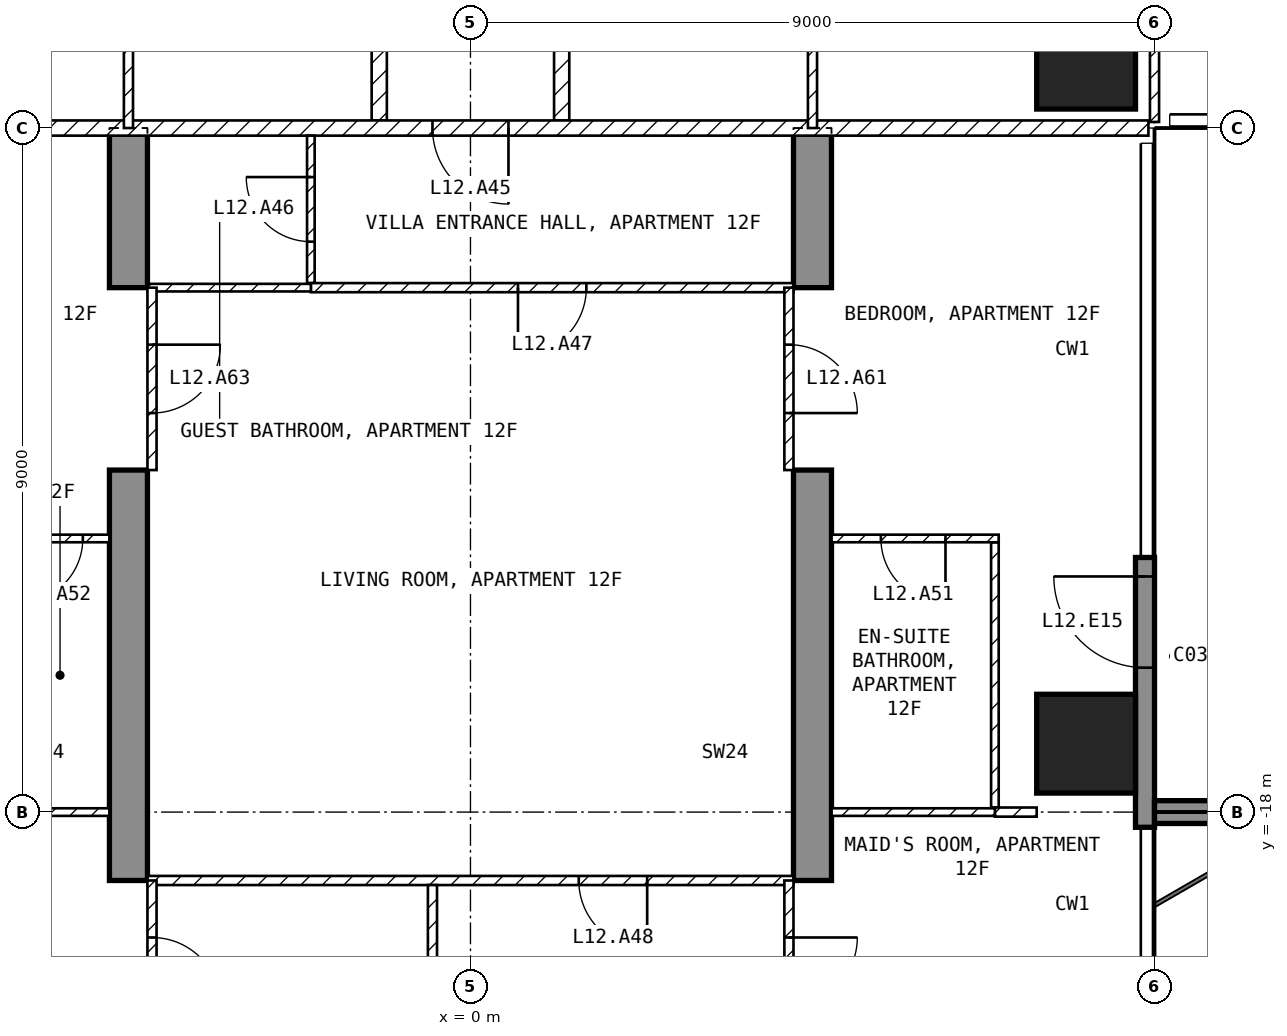
"""IFC4 building model, lengths in metres.
Left out: names, types, materials, properties, quantities, classifications, styles, units other than length and angle.
Written with IfcOpenShell. Run it as: python <this file> out.ifc"""

import sys

from ifc_helpers import new_model, si_unit, direction, frame, frame_2d, origin, origin_2d, place, context, subcontext, project, spatial, polyline, rectangle, outline, extrude, element, fill, save


model = new_model("IFC4")
c1 = context("Model", 3, precision=1e-05, world=origin(), true_north=direction((0.0, 1.0)))
c2 = subcontext(c1, "Body", "Model", "MODEL_VIEW")
j1 = project(units=[si_unit("LENGTHUNIT", "METRE"), si_unit("PLANEANGLEUNIT", "RADIAN")], contexts=[c1])
p1 = place(None, origin())
s1 = spatial("IfcSite", under=j1, at=p1, CompositionType="ELEMENT")
p2 = place(p1, origin())
s2 = spatial("IfcBuilding", under=s1, at=p2, CompositionType="ELEMENT")
p3 = place(p2, frame((0.0, 0.0, 61.0)))
s3 = spatial("IfcBuildingStorey", under=s2, at=p3, CompositionType="ELEMENT", Elevation=61.0)
for number, where, z_axis, x_axis in (
    (1, (8.1, -17.1, -0.25), (0.0, 0.0, 1.0), (1.0, 0.0, 0.0)),
    (2, (8.1, -8.1, -0.25), (0.0, 0.0, 1.0), (1.0, 0.0, 0.0)),
):
    element("IfcColumn", number, at=place(p3, frame(where, z_axis=z_axis, x_axis=x_axis)), inside=s3, PredefinedType="COLUMN", context=c2, shape_type="SweptSolid", body=[
        extrude(rectangle(XDim=1.3, YDim=1.3, at=origin_2d()), origin(), (0.0, 0.0, 1.0), 3.5),
    ])
for number, where, z_axis, x_axis in (
    (3, (-4.75, -25.45, -0.25), (1.0, 0.0, 0.0), (0.0, 1.0, 0.0)),
    (4, (4.25, -25.45, -0.25), (1.0, 0.0, 0.0), (0.0, 1.0, 0.0)),
):
    element("IfcWall", number, at=place(p3, frame(where, z_axis=z_axis, x_axis=x_axis)), inside=s3, PredefinedType="SHEAR", context=c2, shape_type="SweptSolid", body=[
        extrude(outline(polyline([(0.0, 0.0), (4.15, 0.0), (4.15, 2.65), (6.55, 2.65), (6.55, 0.0), (11.95, 0.0), (11.95, 2.65), (14.35, 2.65), (14.35, 0.0), (16.45, 0.0), (16.45, 3.5), (0.0, 3.5), (0.0, 0.0)])), origin(), (0.0, 0.0, 1.0), 0.5),
    ])
p4 = place(p3, frame((8.875, -18.2, 0.0), z_axis=(0.0, 0.0, 1.0), x_axis=(0.0, 1.0, 0.0)))
e5 = element("IfcWall", 5, at=p4, inside=s3, PredefinedType="SOLIDWALL", context=c2, shape_type="SweptSolid", body=[
    extrude(rectangle(XDim=3.55, YDim=0.25, at=frame_2d((1.775, 0.0))), origin(), (0.0, 0.0, 1.0), 3.25),
])
p5 = place(p4, frame((2.1, 0.0, 0.0)))
e6 = element("IfcOpeningElement", 6, at=p5, cuts=e5, PredefinedType="OPENING", context=c2, shape_type="SweptSolid", body=[
    extrude(rectangle(XDim=1.2, YDim=2.4, at=frame_2d((0.6, 1.2))), frame((0.0, 0.135, 0.0), z_axis=(0.0, -1.0, 0.0), x_axis=(1.0, 0.0, 0.0)), (0.0, 0.0, 1.0), 0.27),
])
p6 = place(p3, frame((9.0, -18.0, 0.0), z_axis=(0.0, 0.0, 1.0), x_axis=(1.0, 0.0, 0.0)))
e7 = element("IfcWall", 7, at=p6, inside=s3, PredefinedType="SOLIDWALL", context=c2, shape_type="SweptSolid", body=[
    extrude(rectangle(XDim=2.7, YDim=0.3, at=frame_2d((1.35, 0.0))), origin(), (0.0, 0.0, 1.0), 3.25),
])
for number, where, z_axis, x_axis in (
    (8, (1.2, -1.3, 0.0), (0.0, 0.0, 1.0), (0.0, -1.0, 0.0)),
    (9, (-1.2, -8.9, 0.0), (0.0, 0.0, 1.0), (0.0, 1.0, 0.0)),
):
    element("IfcWall", number, at=place(p3, frame(where, z_axis=z_axis, x_axis=x_axis)), inside=s3, PredefinedType="PARTITIONING", context=c2, shape_type="SweptSolid", body=[
        extrude(rectangle(XDim=7.6, YDim=0.2, at=frame_2d((3.8, 0.0))), origin(), (0.0, 0.0, 1.0), 3.25),
    ])
p7 = place(p3, frame((8.92, -9.0, 0.0), z_axis=(0.0, 0.0, 1.0), x_axis=(-1.0, 0.0, 0.0)))
e10 = element("IfcWall", 10, at=p7, inside=s3, PredefinedType="PARTITIONING", context=c2, shape_type="SweptSolid", body=[
    extrude(rectangle(XDim=17.84, YDim=0.2, at=frame_2d((8.92, 0.0))), origin(), (0.0, 0.0, 1.0), 3.25),
])
p8 = place(p7, frame((8.42, 0.0, 0.0)))
e11 = element("IfcOpeningElement", 11, at=p8, cuts=e10, PredefinedType="OPENING", context=c2, shape_type="SweptSolid", body=[
    extrude(rectangle(XDim=1.0, YDim=2.1, at=frame_2d((0.5, 1.05))), frame((0.0, 0.11, 0.0), z_axis=(0.0, -1.0, 0.0), x_axis=(1.0, 0.0, 0.0)), (0.0, 0.0, 1.0), 0.22),
])
p9 = place(p3, frame((9.0, -8.92, 0.0), z_axis=(0.0, 0.0, 1.0), x_axis=(0.0, 1.0, 0.0)))
e12 = element("IfcWall", 12, at=p9, inside=s3, PredefinedType="PARTITIONING", context=c2, shape_type="SweptSolid", body=[
    extrude(rectangle(XDim=7.62, YDim=0.12, at=frame_2d((3.81, 0.0))), origin(), (0.0, 0.0, 1.0), 3.25),
])
p10 = place(p9, frame((2.67, 0.0, 0.0)))
e13 = element("IfcOpeningElement", 13, at=p10, cuts=e12, PredefinedType="OPENING", context=c2, shape_type="SweptSolid", body=[
    extrude(rectangle(XDim=0.9, YDim=2.1, at=frame_2d((0.45, 1.05))), frame((0.0, 0.07, 0.0), z_axis=(0.0, -1.0, 0.0), x_axis=(1.0, 0.0, 0.0)), (0.0, 0.0, 1.0), 0.14),
])
p11 = place(p3, frame((4.5, -9.0, 0.0), z_axis=(0.0, 0.0, 1.0), x_axis=(0.0, 1.0, 0.0)))
e14 = element("IfcWall", 14, at=p11, inside=s3, PredefinedType="PARTITIONING", context=c2, shape_type="SweptSolid", body=[
    extrude(rectangle(XDim=7.7, YDim=0.12, at=frame_2d((3.85, 0.0))), origin(), (0.0, 0.0, 1.0), 3.25),
])
p12 = place(p11, frame((3.4, 0.0, 0.0)))
e15 = element("IfcOpeningElement", 15, at=p12, cuts=e14, PredefinedType="OPENING", context=c2, shape_type="SweptSolid", body=[
    extrude(rectangle(XDim=0.9, YDim=2.1, at=frame_2d((0.45, 1.05))), frame((0.0, 0.07, 0.0), z_axis=(0.0, -1.0, 0.0), x_axis=(1.0, 0.0, 0.0)), (0.0, 0.0, 1.0), 0.14),
])
p13 = place(p3, frame((-4.5, -1.3, 0.0), z_axis=(0.0, 0.0, 1.0), x_axis=(0.0, -1.0, 0.0)))
e16 = element("IfcWall", 16, at=p13, inside=s3, PredefinedType="PARTITIONING", context=c2, shape_type="SweptSolid", body=[
    extrude(rectangle(XDim=7.7, YDim=0.12, at=frame_2d((3.85, 0.0))), origin(), (0.0, 0.0, 1.0), 3.25),
])
p14 = place(p13, frame((4.988, 0.0, 0.0)))
e17 = element("IfcOpeningElement", 17, at=p14, cuts=e16, PredefinedType="OPENING", context=c2, shape_type="SweptSolid", body=[
    extrude(rectangle(XDim=0.9, YDim=2.1, at=frame_2d((0.45, 1.05))), frame((0.0, 0.07, 0.0), z_axis=(0.0, -1.0, 0.0), x_axis=(1.0, 0.0, 0.0)), (0.0, 0.0, 1.0), 0.14),
])
p15 = place(p3, frame((-2.1, -11.04, 0.0), z_axis=(0.0, 0.0, 1.0), x_axis=(0.0, 1.0, 0.0)))
e18 = element("IfcWall", 18, at=p15, inside=s3, PredefinedType="PARTITIONING", context=c2, shape_type="SweptSolid", body=[
    extrude(rectangle(XDim=1.94, YDim=0.1, at=frame_2d((0.97, 0.0))), origin(), (0.0, 0.0, 1.0), 3.25),
])
p16 = place(p15, frame((0.545, 0.0, 0.0)))
e19 = element("IfcOpeningElement", 19, at=p16, cuts=e18, PredefinedType="OPENING", context=c2, shape_type="SweptSolid", body=[
    extrude(rectangle(XDim=0.85, YDim=2.1, at=frame_2d((0.425, 1.05))), frame((0.0, 0.06, 0.0), z_axis=(0.0, -1.0, 0.0), x_axis=(1.0, 0.0, 0.0)), (0.0, 0.0, 1.0), 0.12),
])
p17 = place(p3, frame((4.25, -11.1, 0.0), z_axis=(0.0, 0.0, 1.0), x_axis=(-1.0, 0.0, 0.0)))
e20 = element("IfcWall", 20, at=p17, inside=s3, PredefinedType="PARTITIONING", context=c2, shape_type="SweptSolid", body=[
    extrude(rectangle(XDim=6.35, YDim=0.12, at=frame_2d((3.175, 0.0))), origin(), (0.0, 0.0, 1.0), 3.25),
])
p18 = place(p17, frame((2.725, 0.0, 0.0)))
e21 = element("IfcOpeningElement", 21, at=p18, cuts=e20, PredefinedType="OPENING", context=c2, shape_type="SweptSolid", body=[
    extrude(rectangle(XDim=0.9, YDim=2.1, at=frame_2d((0.45, 1.05))), frame((0.0, 0.07, 0.0), z_axis=(0.0, -1.0, 0.0), x_axis=(1.0, 0.0, 0.0)), (0.0, 0.0, 1.0), 0.14),
])
p19 = place(p3, frame((-2.1, -11.1, 0.0), z_axis=(0.0, 0.0, 1.0), x_axis=(-1.0, 0.0, 0.0)))
e22 = element("IfcWall", 22, at=p19, inside=s3, PredefinedType="PARTITIONING", context=c2, shape_type="SweptSolid", body=[
    extrude(rectangle(XDim=2.15, YDim=0.1, at=frame_2d((1.075, 0.0))), origin(), (0.0, 0.0, 1.0), 3.25),
])
p20 = place(p3, frame((4.25, -18.9, 0.0), z_axis=(0.0, 0.0, 1.0), x_axis=(-1.0, 0.0, 0.0)))
e23 = element("IfcWall", 23, at=p20, inside=s3, PredefinedType="PARTITIONING", context=c2, shape_type="SweptSolid", body=[
    extrude(rectangle(XDim=8.5, YDim=0.12, at=frame_2d((4.25, 0.0))), origin(), (0.0, 0.0, 1.0), 3.25),
])
p21 = place(p20, frame((1.925, 0.0, 0.0)))
e24 = element("IfcOpeningElement", 24, at=p21, cuts=e23, PredefinedType="OPENING", context=c2, shape_type="SweptSolid", body=[
    extrude(rectangle(XDim=0.9, YDim=2.1, at=frame_2d((0.45, 1.05))), frame((0.0, 0.07, 0.0), z_axis=(0.0, -1.0, 0.0), x_axis=(1.0, 0.0, 0.0)), (0.0, 0.0, 1.0), 0.14),
])
p22 = place(p3, frame((-0.5, -23.34, 0.0), z_axis=(0.0, 0.0, 1.0), x_axis=(0.0, 1.0, 0.0)))
e25 = element("IfcWall", 25, at=p22, inside=s3, PredefinedType="PARTITIONING", context=c2, shape_type="SweptSolid", body=[
    extrude(rectangle(XDim=4.38, YDim=0.12, at=frame_2d((2.19, 0.0))), origin(), (0.0, 0.0, 1.0), 3.25),
])
p23 = place(p22, frame((1.74, 0.0, 0.0)))
e26 = element("IfcOpeningElement", 26, at=p23, cuts=e25, PredefinedType="OPENING", context=c2, shape_type="SweptSolid", body=[
    extrude(rectangle(XDim=0.9, YDim=2.1, at=frame_2d((0.45, 1.05))), frame((0.0, 0.07, 0.0), z_axis=(0.0, -1.0, 0.0), x_axis=(1.0, 0.0, 0.0)), (0.0, 0.0, 1.0), 0.14),
])
p24 = place(p3, frame((6.9, -17.94, 0.0), z_axis=(0.0, 0.0, 1.0), x_axis=(0.0, 1.0, 0.0)))
e27 = element("IfcWall", 27, at=p24, inside=s3, PredefinedType="PARTITIONING", context=c2, shape_type="SweptSolid", body=[
    extrude(rectangle(XDim=3.49, YDim=0.1, at=frame_2d((1.745, 0.0))), origin(), (0.0, 0.0, 1.0), 3.25),
])
p25 = place(p3, frame((6.95, -14.4, 0.0), z_axis=(0.0, 0.0, 1.0), x_axis=(-1.0, 0.0, 0.0)))
e28 = element("IfcWall", 28, at=p25, inside=s3, PredefinedType="PARTITIONING", context=c2, shape_type="SweptSolid", body=[
    extrude(rectangle(XDim=2.2, YDim=0.1, at=frame_2d((1.1, 0.0))), origin(), (0.0, 0.0, 1.0), 3.25),
])
p26 = place(p25, frame((0.7, 0.0, 0.0)))
e29 = element("IfcOpeningElement", 29, at=p26, cuts=e28, PredefinedType="OPENING", context=c2, shape_type="SweptSolid", body=[
    extrude(rectangle(XDim=0.85, YDim=2.1, at=frame_2d((0.425, 1.05))), frame((0.0, 0.06, 0.0), z_axis=(0.0, -1.0, 0.0), x_axis=(1.0, 0.0, 0.0)), (0.0, 0.0, 1.0), 0.12),
])
p27 = place(p3, frame((7.45, -18.0, 0.0), z_axis=(0.0, 0.0, 1.0), x_axis=(-1.0, 0.0, 0.0)))
e30 = element("IfcWall", 30, at=p27, inside=s3, PredefinedType="PARTITIONING", context=c2, shape_type="SweptSolid", body=[
    extrude(rectangle(XDim=0.55, YDim=0.12, at=frame_2d((0.275, 0.0))), origin(), (0.0, 0.0, 1.0), 3.25),
])
p28 = place(p3, frame((6.9, -18.0, 0.0), z_axis=(0.0, 0.0, 1.0), x_axis=(-1.0, 0.0, 0.0)))
e31 = element("IfcWall", 31, at=p28, inside=s3, PredefinedType="PARTITIONING", context=c2, shape_type="SweptSolid", body=[
    extrude(rectangle(XDim=2.15, YDim=0.1, at=frame_2d((1.075, 0.0))), origin(), (0.0, 0.0, 1.0), 3.25),
])
p29 = place(p3, frame((-4.75, -14.4, 0.0), z_axis=(0.0, 0.0, 1.0), x_axis=(-1.0, 0.0, 0.0)))
e32 = element("IfcWall", 32, at=p29, inside=s3, PredefinedType="PARTITIONING", context=c2, shape_type="SweptSolid", body=[
    extrude(rectangle(XDim=1.6, YDim=0.1, at=frame_2d((0.8, 0.0))), origin(), (0.0, 0.0, 1.0), 3.25),
])
p30 = place(p29, frame((0.35, 0.0, 0.0)))
e33 = element("IfcOpeningElement", 33, at=p30, cuts=e32, PredefinedType="OPENING", context=c2, shape_type="SweptSolid", body=[
    extrude(rectangle(XDim=0.85, YDim=2.1, at=frame_2d((0.425, 1.05))), frame((0.0, 0.06, 0.0), z_axis=(0.0, -1.0, 0.0), x_axis=(1.0, 0.0, 0.0)), (0.0, 0.0, 1.0), 0.12),
])
p31 = place(p3, frame((-4.75, -18.0, 0.0), z_axis=(0.0, 0.0, 1.0), x_axis=(-1.0, 0.0, 0.0)))
e34 = element("IfcWall", 34, at=p31, inside=s3, PredefinedType="PARTITIONING", context=c2, shape_type="SweptSolid", body=[
    extrude(rectangle(XDim=1.55, YDim=0.1, at=frame_2d((0.775, 0.0))), origin(), (0.0, 0.0, 1.0), 3.25),
])
p32 = place(p3, frame((4.19, -11.1, 0.0), z_axis=(0.0, 0.0, 1.0), x_axis=(0.0, -1.0, 0.0)))
e35 = element("IfcWall", 35, at=p32, inside=s3, PredefinedType="PARTITIONING", context=c2, shape_type="SweptSolid", body=[
    extrude(rectangle(XDim=2.4, YDim=0.12, at=frame_2d((1.2, 0.0))), origin(), (0.0, 0.0, 1.0), 2.4),
])
p33 = place(p32, frame((0.75, 0.0, 0.0)))
e36 = element("IfcOpeningElement", 36, at=p33, cuts=e35, PredefinedType="OPENING", context=c2, shape_type="SweptSolid", body=[
    extrude(rectangle(XDim=0.9, YDim=2.1, at=frame_2d((0.45, 1.05))), frame((0.0, 0.07, 0.0), z_axis=(0.0, -1.0, 0.0), x_axis=(1.0, 0.0, 0.0)), (0.0, 0.0, 1.0), 0.14),
])
p34 = place(p3, frame((4.19, -18.9, 0.0), z_axis=(0.0, 0.0, 1.0), x_axis=(0.0, -1.0, 0.0)))
e37 = element("IfcWall", 37, at=p34, inside=s3, PredefinedType="PARTITIONING", context=c2, shape_type="SweptSolid", body=[
    extrude(rectangle(XDim=2.4, YDim=0.12, at=frame_2d((1.2, 0.0))), origin(), (0.0, 0.0, 1.0), 2.4),
])
p35 = place(p34, frame((0.75, 0.0, 0.0)))
e38 = element("IfcOpeningElement", 38, at=p35, cuts=e37, PredefinedType="OPENING", context=c2, shape_type="SweptSolid", body=[
    extrude(rectangle(XDim=0.9, YDim=2.1, at=frame_2d((0.45, 1.05))), frame((0.0, 0.07, 0.0), z_axis=(0.0, -1.0, 0.0), x_axis=(1.0, 0.0, 0.0)), (0.0, 0.0, 1.0), 0.14),
])
p36 = place(p3, frame((-4.19, -11.1, 0.0), z_axis=(0.0, 0.0, 1.0), x_axis=(0.0, -1.0, 0.0)))
e39 = element("IfcWall", 39, at=p36, inside=s3, PredefinedType="PARTITIONING", context=c2, shape_type="SweptSolid", body=[
    extrude(rectangle(XDim=2.4, YDim=0.12, at=frame_2d((1.2, 0.0))), origin(), (0.0, 0.0, 1.0), 2.4),
])
p37 = place(p36, frame((0.75, 0.0, 0.0)))
e40 = element("IfcOpeningElement", 40, at=p37, cuts=e39, PredefinedType="OPENING", context=c2, shape_type="SweptSolid", body=[
    extrude(rectangle(XDim=0.9, YDim=2.1, at=frame_2d((0.45, 1.05))), frame((0.0, 0.07, 0.0), z_axis=(0.0, -1.0, 0.0), x_axis=(1.0, 0.0, 0.0)), (0.0, 0.0, 1.0), 0.14),
])
p38 = place(p3, frame((-4.19, -18.9, 0.0), z_axis=(0.0, 0.0, 1.0), x_axis=(0.0, -1.0, 0.0)))
e41 = element("IfcWall", 41, at=p38, inside=s3, PredefinedType="PARTITIONING", context=c2, shape_type="SweptSolid", body=[
    extrude(rectangle(XDim=2.4, YDim=0.12, at=frame_2d((1.2, 0.0))), origin(), (0.0, 0.0, 1.0), 2.4),
])
p39 = place(p38, frame((0.75, 0.0, 0.0)))
e42 = element("IfcOpeningElement", 42, at=p39, cuts=e41, PredefinedType="OPENING", context=c2, shape_type="SweptSolid", body=[
    extrude(rectangle(XDim=0.9, YDim=2.1, at=frame_2d((0.45, 1.05))), frame((0.0, 0.07, 0.0), z_axis=(0.0, -1.0, 0.0), x_axis=(1.0, 0.0, 0.0)), (0.0, 0.0, 1.0), 0.14),
])
p40 = place(p5, origin())
e43 = element("IfcDoor", 43, at=p40, inside=s3, OperationType="SINGLE_SWING_RIGHT", PredefinedType="DOOR", context=c2, shape_type="SweptSolid", body=[
    extrude(rectangle(XDim=1.2, YDim=2.4, at=frame_2d((0.6, 1.2))), frame((0.0, 0.025, 0.0), z_axis=(0.0, -1.0, 0.0), x_axis=(1.0, 0.0, 0.0)), (0.0, 0.0, 1.0), 0.05),
])
fill(e6, e43)
p41 = place(p8, origin())
e44 = element("IfcDoor", 44, at=p41, inside=s3, OperationType="SINGLE_SWING_LEFT", PredefinedType="DOOR", context=c2, shape_type="SweptSolid", body=[
    extrude(rectangle(XDim=1.0, YDim=2.1, at=frame_2d((0.5, 1.05))), frame((0.0, 0.025, 0.0), z_axis=(0.0, -1.0, 0.0), x_axis=(1.0, 0.0, 0.0)), (0.0, 0.0, 1.0), 0.05),
])
fill(e11, e44)
p42 = place(p16, origin())
e45 = element("IfcDoor", 45, at=p42, inside=s3, OperationType="SINGLE_SWING_RIGHT", PredefinedType="DOOR", context=c2, shape_type="SweptSolid", body=[
    extrude(rectangle(XDim=0.85, YDim=2.1, at=frame_2d((0.425, 1.05))), frame((0.0, 0.025, 0.0), z_axis=(0.0, -1.0, 0.0), x_axis=(1.0, 0.0, 0.0)), (0.0, 0.0, 1.0), 0.05),
])
fill(e19, e45)
p43 = place(p18, origin())
e46 = element("IfcDoor", 46, at=p43, inside=s3, OperationType="SINGLE_SWING_RIGHT", PredefinedType="DOOR", context=c2, shape_type="SweptSolid", body=[
    extrude(rectangle(XDim=0.9, YDim=2.1, at=frame_2d((0.45, 1.05))), frame((0.0, 0.025, 0.0), z_axis=(0.0, -1.0, 0.0), x_axis=(1.0, 0.0, 0.0)), (0.0, 0.0, 1.0), 0.05),
])
fill(e21, e46)
p44 = place(p21, origin())
e47 = element("IfcDoor", 47, at=p44, inside=s3, OperationType="SINGLE_SWING_LEFT", PredefinedType="DOOR", context=c2, shape_type="SweptSolid", body=[
    extrude(rectangle(XDim=0.9, YDim=2.1, at=frame_2d((0.45, 1.05))), frame((0.0, 0.025, 0.0), z_axis=(0.0, -1.0, 0.0), x_axis=(1.0, 0.0, 0.0)), (0.0, 0.0, 1.0), 0.05),
])
fill(e24, e47)
p45 = place(p26, origin())
e48 = element("IfcDoor", 48, at=p45, inside=s3, OperationType="SINGLE_SWING_LEFT", PredefinedType="DOOR", context=c2, shape_type="SweptSolid", body=[
    extrude(rectangle(XDim=0.85, YDim=2.1, at=frame_2d((0.425, 1.05))), frame((0.0, 0.025, 0.0), z_axis=(0.0, -1.0, 0.0), x_axis=(1.0, 0.0, 0.0)), (0.0, 0.0, 1.0), 0.05),
])
fill(e29, e48)
p46 = place(p30, origin())
e49 = element("IfcDoor", 49, at=p46, inside=s3, OperationType="SINGLE_SWING_RIGHT", PredefinedType="DOOR", context=c2, shape_type="SweptSolid", body=[
    extrude(rectangle(XDim=0.85, YDim=2.1, at=frame_2d((0.425, 1.05))), frame((0.0, 0.025, 0.0), z_axis=(0.0, -1.0, 0.0), x_axis=(1.0, 0.0, 0.0)), (0.0, 0.0, 1.0), 0.05),
])
fill(e33, e49)
p47 = place(p33, origin())
e50 = element("IfcDoor", 50, at=p47, inside=s3, OperationType="SINGLE_SWING_RIGHT", PredefinedType="DOOR", context=c2, shape_type="SweptSolid", body=[
    extrude(rectangle(XDim=0.9, YDim=2.1, at=frame_2d((0.45, 1.05))), frame((0.0, 0.025, 0.0), z_axis=(0.0, -1.0, 0.0), x_axis=(1.0, 0.0, 0.0)), (0.0, 0.0, 1.0), 0.05),
])
fill(e36, e50)
p48 = place(p35, origin())
e51 = element("IfcDoor", 51, at=p48, inside=s3, OperationType="SINGLE_SWING_LEFT", PredefinedType="DOOR", context=c2, shape_type="SweptSolid", body=[
    extrude(rectangle(XDim=0.9, YDim=2.1, at=frame_2d((0.45, 1.05))), frame((0.0, 0.025, 0.0), z_axis=(0.0, -1.0, 0.0), x_axis=(1.0, 0.0, 0.0)), (0.0, 0.0, 1.0), 0.05),
])
fill(e38, e51)
p49 = place(p37, origin())
e52 = element("IfcDoor", 52, at=p49, inside=s3, OperationType="SINGLE_SWING_LEFT", PredefinedType="DOOR", context=c2, shape_type="SweptSolid", body=[
    extrude(rectangle(XDim=0.9, YDim=2.1, at=frame_2d((0.45, 1.05))), frame((0.0, 0.025, 0.0), z_axis=(0.0, -1.0, 0.0), x_axis=(1.0, 0.0, 0.0)), (0.0, 0.0, 1.0), 0.05),
])
fill(e40, e52)
p50 = place(p39, origin())
e53 = element("IfcDoor", 53, at=p50, inside=s3, OperationType="SINGLE_SWING_RIGHT", PredefinedType="DOOR", context=c2, shape_type="SweptSolid", body=[
    extrude(rectangle(XDim=0.9, YDim=2.1, at=frame_2d((0.45, 1.05))), frame((0.0, 0.025, 0.0), z_axis=(0.0, -1.0, 0.0), x_axis=(1.0, 0.0, 0.0)), (0.0, 0.0, 1.0), 0.05),
])
fill(e42, e53)
save(model, sys.argv[1])
